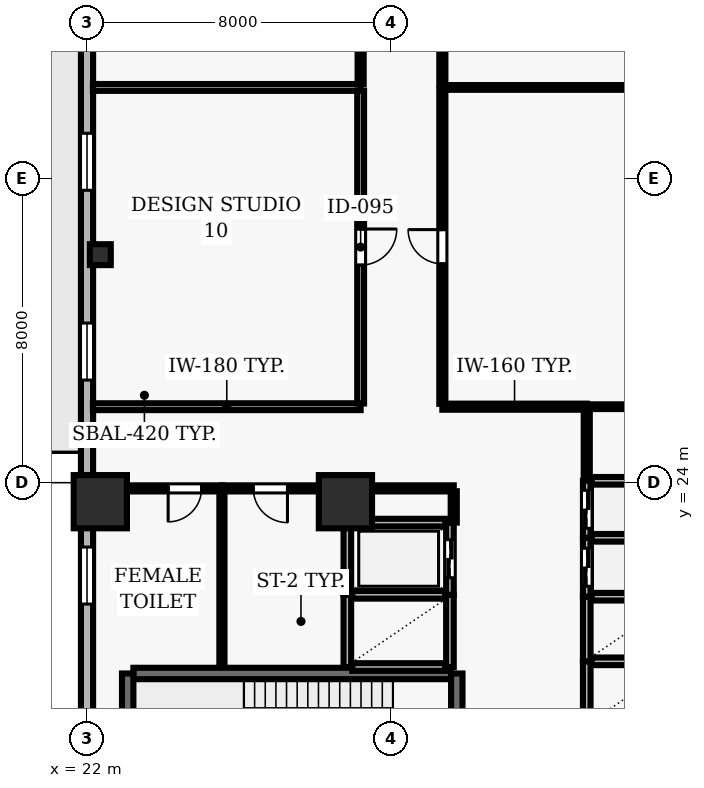
"""IFC4 building model, lengths in metres.
Left out: names, types, materials, properties, quantities, classifications, styles, units other than length and angle.
Written with IfcOpenShell. Run it as: python <this file> out.ifc"""

import sys

from ifc_helpers import new_model, si_unit, direction, frame, frame_2d, origin, origin_2d, place, context, subcontext, project, spatial, rectangle, hollow_rectangle, extrude, element, fill, save


model = new_model("IFC4")
c1 = context("Model", 3, precision=1e-05, world=origin(), true_north=direction((0.0, 1.0)))
c2 = subcontext(c1, "Body", "Model", "MODEL_VIEW")
j1 = project(units=[si_unit("LENGTHUNIT", "METRE"), si_unit("PLANEANGLEUNIT", "RADIAN")], contexts=[c1])
p1 = place(None, origin())
s1 = spatial("IfcSite", under=j1, at=p1, CompositionType="ELEMENT")
p2 = place(p1, origin())
s2 = spatial("IfcBuilding", under=s1, at=p2, CompositionType="ELEMENT")
p3 = place(p2, frame((0.0, 0.0, 26.0)))
s3 = spatial("IfcBuildingStorey", under=s2, at=p3, CompositionType="ELEMENT", Elevation=26.0)
for number, where, z_axis, x_axis in (
    (1, (22.35, 23.5, 0.0), (0.0, 0.0, 1.0), (1.0, 0.0, 0.0)),
    (2, (28.8, 23.5, 0.0), (0.0, 0.0, 1.0), (1.0, 0.0, 0.0)),
):
    element("IfcColumn", number, at=place(p3, frame(where, z_axis=z_axis, x_axis=x_axis)), inside=s3, PredefinedType="COLUMN", context=c2, shape_type="SweptSolid", body=[
        extrude(rectangle(XDim=1.4, YDim=1.4, at=origin_2d()), origin(), (0.0, 0.0, 1.0), 5.0),
    ])
p4 = place(p3, frame((22.35, 30.0, 0.0), z_axis=(0.0, 0.0, 1.0), x_axis=(1.0, 0.0, 0.0)))
e3 = element("IfcColumn", 3, at=p4, inside=s3, PredefinedType="COLUMN", context=c2, shape_type="SweptSolid", body=[
    extrude(hollow_rectangle(XDim=0.55, YDim=0.55, WallThickness=0.025, at=origin_2d()), origin(), (0.0, 0.0, 1.0), 5.0),
])
p5 = place(p3, frame((22.0, 51.5, 0.0), z_axis=(0.0, 0.0, 1.0), x_axis=(0.0, -1.0, 0.0)))
e4 = element("IfcWall", 4, at=p5, inside=s3, PredefinedType="SOLIDWALL", context=c2, shape_type="SweptSolid", body=[
    extrude(rectangle(XDim=49.0, YDim=0.32, at=frame_2d((24.5, 0.0))), origin(), (0.0, 0.0, 1.0), 4.79),
])
p6 = place(p5, frame((12.1, 0.0, 0.0)))
e5 = element("IfcOpeningElement", 5, at=p6, cuts=e4, PredefinedType="OPENING", context=c2, shape_type="SweptSolid", body=[
    extrude(rectangle(XDim=1.0, YDim=2.2, at=frame_2d((0.5, 1.1))), frame((0.0, 0.17, 0.0), z_axis=(0.0, -1.0, 0.0), x_axis=(1.0, 0.0, 0.0)), (0.0, 0.0, 1.0), 0.34),
])
p7 = place(p5, frame((1.972, 0.0, 0.9)))
e6 = element("IfcOpeningElement", 6, at=p7, cuts=e4, PredefinedType="OPENING", context=c2, shape_type="SweptSolid", body=[
    extrude(rectangle(XDim=1.5, YDim=1.8, at=frame_2d((0.75, 0.9))), frame((0.0, 0.17, 0.0), z_axis=(0.0, -1.0, 0.0), x_axis=(1.0, 0.0, 0.0)), (0.0, 0.0, 1.0), 0.34),
])
p8 = place(p5, frame((7.867, 0.0, 0.9)))
e7 = element("IfcOpeningElement", 7, at=p8, cuts=e4, PredefinedType="OPENING", context=c2, shape_type="SweptSolid", body=[
    extrude(rectangle(XDim=1.5, YDim=1.8, at=frame_2d((0.75, 0.9))), frame((0.0, 0.17, 0.0), z_axis=(0.0, -1.0, 0.0), x_axis=(1.0, 0.0, 0.0)), (0.0, 0.0, 1.0), 0.34),
])
p9 = place(p5, frame((18.306, 0.0, 0.9)))
e8 = element("IfcOpeningElement", 8, at=p9, cuts=e4, PredefinedType="OPENING", context=c2, shape_type="SweptSolid", body=[
    extrude(rectangle(XDim=1.5, YDim=1.8, at=frame_2d((0.75, 0.9))), frame((0.0, 0.17, 0.0), z_axis=(0.0, -1.0, 0.0), x_axis=(1.0, 0.0, 0.0)), (0.0, 0.0, 1.0), 0.34),
])
p10 = place(p5, frame((23.3, 0.0, 0.9)))
e9 = element("IfcOpeningElement", 9, at=p10, cuts=e4, PredefinedType="OPENING", context=c2, shape_type="SweptSolid", body=[
    extrude(rectangle(XDim=1.5, YDim=1.8, at=frame_2d((0.75, 0.9))), frame((0.0, 0.17, 0.0), z_axis=(0.0, -1.0, 0.0), x_axis=(1.0, 0.0, 0.0)), (0.0, 0.0, 1.0), 0.34),
])
p11 = place(p5, frame((29.194, 0.0, 0.9)))
e10 = element("IfcOpeningElement", 10, at=p11, cuts=e4, PredefinedType="OPENING", context=c2, shape_type="SweptSolid", body=[
    extrude(rectangle(XDim=1.5, YDim=1.8, at=frame_2d((0.75, 0.9))), frame((0.0, 0.17, 0.0), z_axis=(0.0, -1.0, 0.0), x_axis=(1.0, 0.0, 0.0)), (0.0, 0.0, 1.0), 0.34),
])
p12 = place(p5, frame((34.189, 0.0, 0.9)))
e11 = element("IfcOpeningElement", 11, at=p12, cuts=e4, PredefinedType="OPENING", context=c2, shape_type="SweptSolid", body=[
    extrude(rectangle(XDim=1.5, YDim=1.8, at=frame_2d((0.75, 0.9))), frame((0.0, 0.17, 0.0), z_axis=(0.0, -1.0, 0.0), x_axis=(1.0, 0.0, 0.0)), (0.0, 0.0, 1.0), 0.34),
])
p13 = place(p5, frame((40.083, 0.0, 0.9)))
e12 = element("IfcOpeningElement", 12, at=p13, cuts=e4, PredefinedType="OPENING", context=c2, shape_type="SweptSolid", body=[
    extrude(rectangle(XDim=1.5, YDim=1.8, at=frame_2d((0.75, 0.9))), frame((0.0, 0.17, 0.0), z_axis=(0.0, -1.0, 0.0), x_axis=(1.0, 0.0, 0.0)), (0.0, 0.0, 1.0), 0.34),
])
p14 = place(p3, frame((31.58, 18.98, 0.0), z_axis=(0.0, 0.0, 1.0), x_axis=(-1.0, 0.0, 0.0)))
e13 = element("IfcWall", 13, at=p14, inside=s3, PredefinedType="SHEAR", context=c2, shape_type="SweptSolid", body=[
    extrude(rectangle(XDim=8.36, YDim=0.3, at=frame_2d((4.18, 0.0))), origin(), (0.0, 0.0, 1.0), 4.79),
])
p15 = place(p3, frame((23.07, 18.98, 0.0), z_axis=(0.0, 0.0, 1.0), x_axis=(0.0, -1.0, 0.0)))
e14 = element("IfcWall", 14, at=p15, inside=s3, PredefinedType="SHEAR", context=c2, shape_type="SweptSolid", body=[
    extrude(rectangle(XDim=3.51, YDim=0.3, at=frame_2d((1.755, 0.0))), origin(), (0.0, 0.0, 1.0), 4.79),
])
p16 = place(p3, frame((31.73, 15.47, 0.0), z_axis=(0.0, 0.0, 1.0), x_axis=(0.0, 1.0, 0.0)))
e15 = element("IfcWall", 15, at=p16, inside=s3, PredefinedType="SHEAR", context=c2, shape_type="SweptSolid", body=[
    extrude(rectangle(XDim=3.51, YDim=0.3, at=frame_2d((1.755, 0.0))), origin(), (0.0, 0.0, 1.0), 4.79),
])
p17 = place(p16, frame((1.18, 0.0, 0.0)))
e16 = element("IfcOpeningElement", 16, at=p17, cuts=e15, PredefinedType="OPENING", context=c2, shape_type="SweptSolid", body=[
    extrude(rectangle(XDim=1.15, YDim=2.15, at=frame_2d((0.575, 1.075))), frame((0.0, 0.16, 0.0), z_axis=(0.0, -1.0, 0.0), x_axis=(1.0, 0.0, 0.0)), (0.0, 0.0, 1.0), 0.32),
])
p18 = place(p3, frame((35.15, 19.3, 0.0), z_axis=(0.0, 0.0, 1.0), x_axis=(0.0, -1.0, 0.0)))
e17 = element("IfcWall", 17, at=p18, inside=s3, PredefinedType="SOLIDWALL", context=c2, shape_type="SweptSolid", body=[
    extrude(rectangle(XDim=1.7, YDim=0.2, at=frame_2d((0.85, 0.0))), origin(), (0.0, 0.0, 1.0), 4.79),
])
p19 = place(p3, frame((37.42, 19.3, 0.0), z_axis=(0.0, 0.0, 1.0), x_axis=(-1.0, 0.0, 0.0)))
e18 = element("IfcWall", 18, at=p19, inside=s3, PredefinedType="SOLIDWALL", context=c2, shape_type="SweptSolid", body=[
    extrude(rectangle(XDim=2.14, YDim=0.2, at=frame_2d((1.07, 0.0))), origin(), (0.0, 0.0, 1.0), 4.79),
])
p20 = place(p3, frame((35.15, 21.0, 0.0), z_axis=(0.0, 0.0, 1.0), x_axis=(0.0, -1.0, 0.0)))
e19 = element("IfcWall", 19, at=p20, inside=s3, PredefinedType="SOLIDWALL", context=c2, shape_type="SweptSolid", body=[
    extrude(rectangle(XDim=1.7, YDim=0.2, at=frame_2d((0.85, 0.0))), origin(), (0.0, 0.0, 1.0), 4.79),
])
p21 = place(p3, frame((37.42, 21.0, 0.0), z_axis=(0.0, 0.0, 1.0), x_axis=(-1.0, 0.0, 0.0)))
e20 = element("IfcWall", 20, at=p21, inside=s3, PredefinedType="SOLIDWALL", context=c2, shape_type="SweptSolid", body=[
    extrude(rectangle(XDim=2.14, YDim=0.2, at=frame_2d((1.07, 0.0))), origin(), (0.0, 0.0, 1.0), 4.79),
])
for number, where, z_axis, x_axis in (
    (21, (28.85, 21.05, 0.0), (0.0, 0.0, 1.0), (0.0, -1.0, 0.0)),
    (22, (31.55, 19.15, 0.0), (0.0, 0.0, 1.0), (0.0, 1.0, 0.0)),
):
    element("IfcWall", number, at=place(p3, frame(where, z_axis=z_axis, x_axis=x_axis)), inside=s3, PredefinedType="SOLIDWALL", context=c2, shape_type="SweptSolid", body=[
        extrude(rectangle(XDim=1.9, YDim=0.2, at=frame_2d((0.95, 0.0))), origin(), (0.0, 0.0, 1.0), 4.79),
    ])
for number, where, z_axis, x_axis in (
    (23, (28.98, 19.15, 0.0), (0.0, 0.0, 1.0), (1.0, 0.0, 0.0)),
    (24, (31.42, 21.05, 0.0), (0.0, 0.0, 1.0), (-1.0, 0.0, 0.0)),
):
    element("IfcWall", number, at=place(p3, frame(where, z_axis=z_axis, x_axis=x_axis)), inside=s3, PredefinedType="SOLIDWALL", context=c2, shape_type="SweptSolid", body=[
        extrude(rectangle(XDim=2.44, YDim=0.2, at=frame_2d((1.22, 0.0))), origin(), (0.0, 0.0, 1.0), 4.79),
    ])
p22 = place(p3, frame((35.15, 22.55, 0.0), z_axis=(0.0, 0.0, 1.0), x_axis=(0.0, -1.0, 0.0)))
e25 = element("IfcWall", 25, at=p22, inside=s3, PredefinedType="SOLIDWALL", context=c2, shape_type="SweptSolid", body=[
    extrude(rectangle(XDim=1.55, YDim=0.2, at=frame_2d((0.775, 0.0))), origin(), (0.0, 0.0, 1.0), 4.79),
])
p23 = place(p22, frame((0.275, 0.0, 0.0)))
e26 = element("IfcOpeningElement", 26, at=p23, cuts=e25, PredefinedType="OPENING", context=c2, shape_type="SweptSolid", body=[
    extrude(rectangle(XDim=1.0, YDim=2.1, at=frame_2d((0.5, 1.05))), frame((0.0, 0.11, 0.0), z_axis=(0.0, -1.0, 0.0), x_axis=(1.0, 0.0, 0.0)), (0.0, 0.0, 1.0), 0.22),
])
p24 = place(p3, frame((37.42, 22.55, 0.0), z_axis=(0.0, 0.0, 1.0), x_axis=(-1.0, 0.0, 0.0)))
e27 = element("IfcWall", 27, at=p24, inside=s3, PredefinedType="SOLIDWALL", context=c2, shape_type="SweptSolid", body=[
    extrude(rectangle(XDim=2.14, YDim=0.2, at=frame_2d((1.07, 0.0))), origin(), (0.0, 0.0, 1.0), 4.79),
])
p25 = place(p3, frame((35.15, 24.05, 0.0), z_axis=(0.0, 0.0, 1.0), x_axis=(0.0, -1.0, 0.0)))
e28 = element("IfcWall", 28, at=p25, inside=s3, PredefinedType="SOLIDWALL", context=c2, shape_type="SweptSolid", body=[
    extrude(rectangle(XDim=1.5, YDim=0.2, at=frame_2d((0.75, 0.0))), origin(), (0.0, 0.0, 1.0), 4.79),
])
p26 = place(p25, frame((0.25, 0.0, 0.0)))
e29 = element("IfcOpeningElement", 29, at=p26, cuts=e28, PredefinedType="OPENING", context=c2, shape_type="SweptSolid", body=[
    extrude(rectangle(XDim=1.0, YDim=2.1, at=frame_2d((0.5, 1.05))), frame((0.0, 0.11, 0.0), z_axis=(0.0, -1.0, 0.0), x_axis=(1.0, 0.0, 0.0)), (0.0, 0.0, 1.0), 0.22),
])
p27 = place(p3, frame((37.42, 24.05, 0.0), z_axis=(0.0, 0.0, 1.0), x_axis=(-1.0, 0.0, 0.0)))
e30 = element("IfcWall", 30, at=p27, inside=s3, PredefinedType="SOLIDWALL", context=c2, shape_type="SweptSolid", body=[
    extrude(rectangle(XDim=2.14, YDim=0.2, at=frame_2d((1.07, 0.0))), origin(), (0.0, 0.0, 1.0), 4.79),
])
p28 = place(p3, frame((28.85, 22.95, 0.0), z_axis=(0.0, 0.0, 1.0), x_axis=(0.0, -1.0, 0.0)))
e31 = element("IfcWall", 31, at=p28, inside=s3, PredefinedType="SOLIDWALL", context=c2, shape_type="SweptSolid", body=[
    extrude(rectangle(XDim=1.9, YDim=0.2, at=frame_2d((0.95, 0.0))), origin(), (0.0, 0.0, 1.0), 4.79),
])
p29 = place(p3, frame((31.55, 21.05, 0.0), z_axis=(0.0, 0.0, 1.0), x_axis=(0.0, 1.0, 0.0)))
e32 = element("IfcWall", 32, at=p29, inside=s3, PredefinedType="SOLIDWALL", context=c2, shape_type="SweptSolid", body=[
    extrude(rectangle(XDim=1.9, YDim=0.2, at=frame_2d((0.95, 0.0))), origin(), (0.0, 0.0, 1.0), 4.79),
])
p30 = place(p29, frame((0.45, 0.0, 0.0)))
e33 = element("IfcOpeningElement", 33, at=p30, cuts=e32, PredefinedType="OPENING", context=c2, shape_type="SweptSolid", body=[
    extrude(rectangle(XDim=1.0, YDim=2.1, at=frame_2d((0.5, 1.05))), frame((0.0, 0.11, 0.0), z_axis=(0.0, -1.0, 0.0), x_axis=(1.0, 0.0, 0.0)), (0.0, 0.0, 1.0), 0.22),
])
p31 = place(p3, frame((31.43, 22.95, 0.0), z_axis=(0.0, 0.0, 1.0), x_axis=(-1.0, 0.0, 0.0)))
e34 = element("IfcWall", 34, at=p31, inside=s3, PredefinedType="SOLIDWALL", context=c2, shape_type="SweptSolid", body=[
    extrude(rectangle(XDim=2.46, YDim=0.2, at=frame_2d((1.23, 0.0))), origin(), (0.0, 0.0, 1.0), 4.79),
])
p32 = place(p3, frame((25.55, 23.85, 0.0), z_axis=(0.0, 0.0, 1.0), x_axis=(-1.0, 0.0, 0.0)))
e35 = element("IfcWall", 35, at=p32, inside=s3, PredefinedType="PARTITIONING", context=c2, shape_type="SweptSolid", body=[
    extrude(rectangle(XDim=3.35, YDim=0.16, at=frame_2d((1.675, 0.0))), origin(), (0.0, 0.0, 1.0), 4.155),
])
p33 = place(p32, frame((0.535, 0.0, 0.0)))
e36 = element("IfcOpeningElement", 36, at=p33, cuts=e35, PredefinedType="OPENING", context=c2, shape_type="SweptSolid", body=[
    extrude(rectangle(XDim=0.88, YDim=2.1, at=frame_2d((0.44, 1.05))), frame((0.0, 0.09, 0.0), z_axis=(0.0, -1.0, 0.0), x_axis=(1.0, 0.0, 0.0)), (0.0, 0.0, 1.0), 0.18),
])
p34 = place(p3, frame((28.8, 23.85, 0.0), z_axis=(0.0, 0.0, 1.0), x_axis=(-1.0, 0.0, 0.0)))
e37 = element("IfcWall", 37, at=p34, inside=s3, PredefinedType="PARTITIONING", context=c2, shape_type="SweptSolid", body=[
    extrude(rectangle(XDim=3.25, YDim=0.16, at=frame_2d((1.625, 0.0))), origin(), (0.0, 0.0, 1.0), 4.155),
])
p35 = place(p34, frame((1.525, 0.0, 0.0)))
e38 = element("IfcOpeningElement", 38, at=p35, cuts=e37, PredefinedType="OPENING", context=c2, shape_type="SweptSolid", body=[
    extrude(rectangle(XDim=0.9, YDim=2.1, at=frame_2d((0.45, 1.05))), frame((0.0, 0.09, 0.0), z_axis=(0.0, -1.0, 0.0), x_axis=(1.0, 0.0, 0.0)), (0.0, 0.0, 1.0), 0.18),
])
p36 = place(p3, frame((28.8, 23.85, 0.0), z_axis=(0.0, 0.0, 1.0), x_axis=(1.0, 0.0, 0.0)))
e39 = element("IfcWall", 39, at=p36, inside=s3, PredefinedType="PARTITIONING", context=c2, shape_type="SweptSolid", body=[
    extrude(rectangle(XDim=2.85, YDim=0.16, at=frame_2d((1.425, 0.0))), origin(), (0.0, 0.0, 1.0), 4.79),
])
for number, where, z_axis, x_axis in (
    (40, (29.2, 26.0, 0.0), (0.0, 0.0, 1.0), (-1.0, 0.0, 0.0)),
    (41, (29.2, 34.4, 0.0), (0.0, 0.0, 1.0), (-1.0, 0.0, 0.0)),
):
    element("IfcWall", number, at=place(p3, frame(where, z_axis=z_axis, x_axis=x_axis)), inside=s3, PredefinedType="PARTITIONING", context=c2, shape_type="SweptSolid", body=[
        extrude(rectangle(XDim=7.045, YDim=0.18, at=frame_2d((3.522, 0.0))), origin(), (0.0, 0.0, 1.0), 4.79),
    ])
p37 = place(p3, frame((35.15, 26.0, 0.0), z_axis=(0.0, 0.0, 1.0), x_axis=(-1.0, 0.0, 0.0)))
e42 = element("IfcWall", 42, at=p37, inside=s3, PredefinedType="PARTITIONING", context=c2, shape_type="SweptSolid", body=[
    extrude(rectangle(XDim=3.8, YDim=0.16, at=frame_2d((1.9, 0.0))), origin(), (0.0, 0.0, 1.0), 4.79),
])
p38 = place(p3, frame((35.15, 26.0, 0.0), z_axis=(0.0, 0.0, 1.0), x_axis=(1.0, 0.0, 0.0)))
e43 = element("IfcWall", 43, at=p38, inside=s3, PredefinedType="PARTITIONING", context=c2, shape_type="SweptSolid", body=[
    extrude(rectangle(XDim=2.7, YDim=0.125, at=frame_2d((1.35, 0.0))), origin(), (0.0, 0.0, 1.0), 4.79),
])
p39 = place(p3, frame((37.845, 34.4, 0.0), z_axis=(0.0, 0.0, 1.0), x_axis=(-1.0, 0.0, 0.0)))
e44 = element("IfcWall", 44, at=p39, inside=s3, PredefinedType="PARTITIONING", context=c2, shape_type="SweptSolid", body=[
    extrude(rectangle(XDim=6.495, YDim=0.125, at=frame_2d((3.248, 0.0))), origin(), (0.0, 0.0, 1.0), 4.79),
])
p40 = place(p3, frame((25.55, 19.16, 0.0), z_axis=(0.0, 0.0, 1.0), x_axis=(0.0, 1.0, 0.0)))
e45 = element("IfcWall", 45, at=p40, inside=s3, PredefinedType="PARTITIONING", context=c2, shape_type="SweptSolid", body=[
    extrude(rectangle(XDim=4.615, YDim=0.135, at=frame_2d((2.308, 0.0))), origin(), (0.0, 0.0, 1.0), 4.79),
])
p41 = place(p3, frame((28.8, 22.95, 0.0), z_axis=(0.0, 0.0, 1.0), x_axis=(0.0, 1.0, 0.0)))
e46 = element("IfcWall", 46, at=p41, inside=s3, PredefinedType="PARTITIONING", context=c2, shape_type="SweptSolid", body=[
    extrude(rectangle(XDim=0.825, YDim=0.125, at=frame_2d((0.413, 0.0))), origin(), (0.0, 0.0, 1.0), 4.79),
])
p42 = place(p3, frame((29.2, 34.315, 0.0), z_axis=(0.0, 0.0, 1.0), x_axis=(0.0, -1.0, 0.0)))
e47 = element("IfcWall", 47, at=p42, inside=s3, PredefinedType="PARTITIONING", context=c2, shape_type="SweptSolid", body=[
    extrude(rectangle(XDim=8.23, YDim=0.18, at=frame_2d((4.115, 0.0))), origin(), (0.0, 0.0, 1.0), 4.79),
])
p43 = place(p42, frame((3.64, 0.0, 0.0)))
e48 = element("IfcOpeningElement", 48, at=p43, cuts=e47, PredefinedType="OPENING", context=c2, shape_type="SweptSolid", body=[
    extrude(rectangle(XDim=0.95, YDim=2.1, at=frame_2d((0.475, 1.05))), frame((0.0, 0.1, 0.0), z_axis=(0.0, -1.0, 0.0), x_axis=(1.0, 0.0, 0.0)), (0.0, 0.0, 1.0), 0.2),
])
p44 = place(p3, frame((29.2, 44.143, 0.0), z_axis=(0.0, 0.0, 1.0), x_axis=(0.0, -1.0, 0.0)))
e49 = element("IfcWall", 49, at=p44, inside=s3, PredefinedType="PARTITIONING", context=c2, shape_type="SweptSolid", body=[
    extrude(rectangle(XDim=9.658, YDim=0.16, at=frame_2d((4.829, 0.0))), origin(), (0.0, 0.0, 1.0), 4.79),
])
p45 = place(p44, frame((4.379, 0.0, 0.0)))
e50 = element("IfcOpeningElement", 50, at=p45, cuts=e49, PredefinedType="OPENING", context=c2, shape_type="SweptSolid", body=[
    extrude(rectangle(XDim=0.9, YDim=2.1, at=frame_2d((0.45, 1.05))), frame((0.0, 0.09, 0.0), z_axis=(0.0, -1.0, 0.0), x_axis=(1.0, 0.0, 0.0)), (0.0, 0.0, 1.0), 0.18),
])
p46 = place(p3, frame((31.35, 26.075, 0.0), z_axis=(0.0, 0.0, 1.0), x_axis=(0.0, 1.0, 0.0)))
e51 = element("IfcWall", 51, at=p46, inside=s3, PredefinedType="PARTITIONING", context=c2, shape_type="SweptSolid", body=[
    extrude(rectangle(XDim=8.268, YDim=0.16, at=frame_2d((4.134, 0.0))), origin(), (0.0, 0.0, 1.0), 4.79),
])
p47 = place(p46, frame((3.684, 0.0, 0.0)))
e52 = element("IfcOpeningElement", 52, at=p47, cuts=e51, PredefinedType="OPENING", context=c2, shape_type="SweptSolid", body=[
    extrude(rectangle(XDim=0.9, YDim=2.1, at=frame_2d((0.45, 1.05))), frame((0.0, 0.09, 0.0), z_axis=(0.0, -1.0, 0.0), x_axis=(1.0, 0.0, 0.0)), (0.0, 0.0, 1.0), 0.18),
])
p48 = place(p3, frame((31.35, 34.457, 0.0), z_axis=(0.0, 0.0, 1.0), x_axis=(0.0, 1.0, 0.0)))
e53 = element("IfcWall", 53, at=p48, inside=s3, PredefinedType="PARTITIONING", context=c2, shape_type="SweptSolid", body=[
    extrude(rectangle(XDim=9.693, YDim=0.16, at=frame_2d((4.846, 0.0))), origin(), (0.0, 0.0, 1.0), 4.79),
])
p49 = place(p48, frame((4.396, 0.0, 0.0)))
e54 = element("IfcOpeningElement", 54, at=p49, cuts=e53, PredefinedType="OPENING", context=c2, shape_type="SweptSolid", body=[
    extrude(rectangle(XDim=0.9, YDim=2.1, at=frame_2d((0.45, 1.05))), frame((0.0, 0.09, 0.0), z_axis=(0.0, -1.0, 0.0), x_axis=(1.0, 0.0, 0.0)), (0.0, 0.0, 1.0), 0.18),
])
p50 = place(p3, frame((31.65, 23.775, 0.0), z_axis=(0.0, 0.0, 1.0), x_axis=(0.0, -1.0, 0.0)))
e55 = element("IfcWall", 55, at=p50, inside=s3, PredefinedType="PARTITIONING", context=c2, shape_type="SweptSolid", body=[
    extrude(rectangle(XDim=0.825, YDim=0.16, at=frame_2d((0.413, 0.0))), origin(), (0.0, 0.0, 1.0), 4.79),
])
p51 = place(p3, frame((35.15, 24.07, 0.0), z_axis=(0.0, 0.0, 1.0), x_axis=(0.0, 1.0, 0.0)))
e56 = element("IfcWall", 56, at=p51, inside=s3, PredefinedType="PARTITIONING", context=c2, shape_type="SweptSolid", body=[
    extrude(rectangle(XDim=1.855, YDim=0.16, at=frame_2d((0.927, 0.0))), origin(), (0.0, 0.0, 1.0), 4.79),
])
p52 = place(p9, origin())
e57 = element("IfcWindow", 57, at=p52, inside=s3, PartitioningType="SINGLE_PANEL", PredefinedType="WINDOW", context=c2, shape_type="SweptSolid", body=[
    extrude(rectangle(XDim=1.5, YDim=1.8, at=frame_2d((0.75, 0.9))), frame((0.0, 0.03, 0.0), z_axis=(0.0, -1.0, 0.0), x_axis=(1.0, 0.0, 0.0)), (0.0, 0.0, 1.0), 0.06),
])
fill(e8, e57)
p53 = place(p10, origin())
e58 = element("IfcWindow", 58, at=p53, inside=s3, PartitioningType="SINGLE_PANEL", PredefinedType="WINDOW", context=c2, shape_type="SweptSolid", body=[
    extrude(rectangle(XDim=1.5, YDim=1.8, at=frame_2d((0.75, 0.9))), frame((0.0, 0.03, 0.0), z_axis=(0.0, -1.0, 0.0), x_axis=(1.0, 0.0, 0.0)), (0.0, 0.0, 1.0), 0.06),
])
fill(e9, e58)
p54 = place(p11, origin())
e59 = element("IfcWindow", 59, at=p54, inside=s3, PartitioningType="SINGLE_PANEL", PredefinedType="WINDOW", context=c2, shape_type="SweptSolid", body=[
    extrude(rectangle(XDim=1.5, YDim=1.8, at=frame_2d((0.75, 0.9))), frame((0.0, 0.03, 0.0), z_axis=(0.0, -1.0, 0.0), x_axis=(1.0, 0.0, 0.0)), (0.0, 0.0, 1.0), 0.06),
])
fill(e10, e59)
p55 = place(p23, origin())
e60 = element("IfcDoor", 60, at=p55, inside=s3, OperationType="DOUBLE_DOOR_SLIDING", PredefinedType="DOOR", context=c2, shape_type="SweptSolid", body=[
    extrude(rectangle(XDim=1.0, YDim=2.1, at=frame_2d((0.5, 1.05))), frame((0.0, 0.025, 0.0), z_axis=(0.0, -1.0, 0.0), x_axis=(1.0, 0.0, 0.0)), (0.0, 0.0, 1.0), 0.05),
])
fill(e26, e60)
p56 = place(p26, origin())
e61 = element("IfcDoor", 61, at=p56, inside=s3, OperationType="DOUBLE_DOOR_SLIDING", PredefinedType="DOOR", context=c2, shape_type="SweptSolid", body=[
    extrude(rectangle(XDim=1.0, YDim=2.1, at=frame_2d((0.5, 1.05))), frame((0.0, 0.025, 0.0), z_axis=(0.0, -1.0, 0.0), x_axis=(1.0, 0.0, 0.0)), (0.0, 0.0, 1.0), 0.05),
])
fill(e29, e61)
p57 = place(p30, origin())
e62 = element("IfcDoor", 62, at=p57, inside=s3, OperationType="DOUBLE_DOOR_SLIDING", PredefinedType="DOOR", context=c2, shape_type="SweptSolid", body=[
    extrude(rectangle(XDim=1.0, YDim=2.1, at=frame_2d((0.5, 1.05))), frame((0.0, 0.025, 0.0), z_axis=(0.0, -1.0, 0.0), x_axis=(1.0, 0.0, 0.0)), (0.0, 0.0, 1.0), 0.05),
])
fill(e33, e62)
p58 = place(p33, origin())
e63 = element("IfcDoor", 63, at=p58, inside=s3, OperationType="SINGLE_SWING_RIGHT", PredefinedType="DOOR", context=c2, shape_type="SweptSolid", body=[
    extrude(rectangle(XDim=0.88, YDim=2.1, at=frame_2d((0.44, 1.05))), frame((0.0, 0.025, 0.0), z_axis=(0.0, -1.0, 0.0), x_axis=(1.0, 0.0, 0.0)), (0.0, 0.0, 1.0), 0.05),
])
fill(e36, e63)
p59 = place(p35, origin())
e64 = element("IfcDoor", 64, at=p59, inside=s3, OperationType="SINGLE_SWING_LEFT", PredefinedType="DOOR", context=c2, shape_type="SweptSolid", body=[
    extrude(rectangle(XDim=0.9, YDim=2.1, at=frame_2d((0.45, 1.05))), frame((0.0, 0.025, 0.0), z_axis=(0.0, -1.0, 0.0), x_axis=(1.0, 0.0, 0.0)), (0.0, 0.0, 1.0), 0.05),
])
fill(e38, e64)
p60 = place(p43, origin())
e65 = element("IfcDoor", 65, at=p60, inside=s3, OperationType="SINGLE_SWING_LEFT", PredefinedType="DOOR", context=c2, shape_type="SweptSolid", body=[
    extrude(rectangle(XDim=0.95, YDim=2.1, at=frame_2d((0.475, 1.05))), frame((0.0, 0.025, 0.0), z_axis=(0.0, -1.0, 0.0), x_axis=(1.0, 0.0, 0.0)), (0.0, 0.0, 1.0), 0.05),
])
fill(e48, e65)
p61 = place(p47, origin())
e66 = element("IfcDoor", 66, at=p61, inside=s3, OperationType="SINGLE_SWING_RIGHT", PredefinedType="DOOR", context=c2, shape_type="SweptSolid", body=[
    extrude(rectangle(XDim=0.9, YDim=2.1, at=frame_2d((0.45, 1.05))), frame((0.0, 0.025, 0.0), z_axis=(0.0, -1.0, 0.0), x_axis=(1.0, 0.0, 0.0)), (0.0, 0.0, 1.0), 0.05),
])
fill(e52, e66)
save(model, sys.argv[1])
